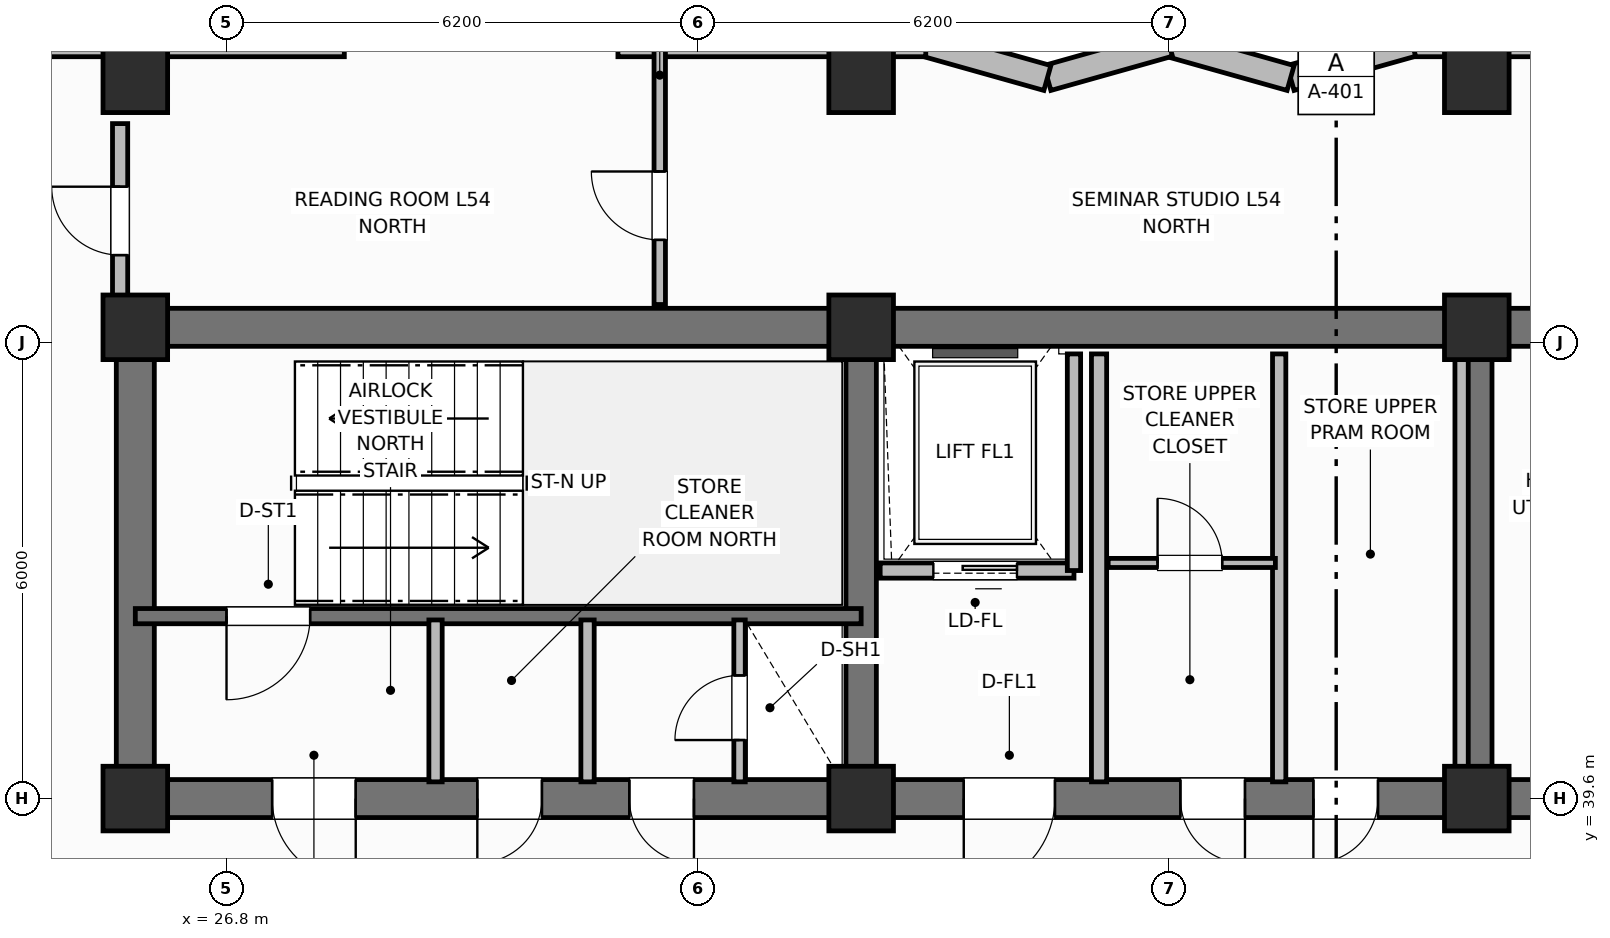
"""IFC4 building model, lengths in metres.
Left out: names, types, materials, properties, quantities, classifications, styles, units other than length and angle.
Written with IfcOpenShell. Run it as: python <this file> out.ifc"""

import sys

from ifc_helpers import new_model, si_unit, direction, frame, frame_2d, origin, origin_2d, place, context, subcontext, project, spatial, rectangle, extrude, element, fill, save


model = new_model("IFC4")
c1 = context("Model", 3, precision=1e-05, world=origin(), true_north=direction((0.0, 1.0)))
c2 = subcontext(c1, "Body", "Model", "MODEL_VIEW")
j1 = project(units=[si_unit("LENGTHUNIT", "METRE"), si_unit("PLANEANGLEUNIT", "RADIAN")], contexts=[c1])
p1 = place(None, origin())
s1 = spatial("IfcSite", under=j1, at=p1, CompositionType="ELEMENT")
p2 = place(p1, origin())
s2 = spatial("IfcBuilding", under=s1, at=p2, CompositionType="ELEMENT")
p3 = place(p2, frame((0.0, 0.0, 218.4)))
s3 = spatial("IfcBuildingStorey", under=s2, at=p3, CompositionType="ELEMENT", Elevation=218.4)
p4 = place(p3, frame((25.6, 45.8, 0.0), z_axis=(0.0, 0.0, 1.0), x_axis=(1.0, 0.0, 0.0)))
e1 = element("IfcWall", 1, at=p4, inside=s3, PredefinedType="SHEAR", context=c2, shape_type="SweptSolid", body=[
    extrude(rectangle(XDim=27.2, YDim=0.5, at=frame_2d((13.6, 0.0))), origin(), (0.0, 0.0, 1.0), 3.7),
])
p5 = place(p3, frame((25.6, 39.85, 0.0), z_axis=(0.0, 0.0, 1.0), x_axis=(0.0, 1.0, 0.0)))
e2 = element("IfcWall", 2, at=p5, inside=s3, PredefinedType="SHEAR", context=c2, shape_type="SweptSolid", body=[
    extrude(rectangle(XDim=5.7, YDim=0.5, at=frame_2d((2.85, 0.0))), origin(), (0.0, 0.0, 1.0), 3.7),
])
p6 = place(p3, frame((52.8, 39.6, 0.0), z_axis=(0.0, 0.0, 1.0), x_axis=(-1.0, 0.0, 0.0)))
e3 = element("IfcWall", 3, at=p6, inside=s3, PredefinedType="SHEAR", context=c2, shape_type="SweptSolid", body=[
    extrude(rectangle(XDim=27.2, YDim=0.5, at=frame_2d((13.6, 0.0))), origin(), (0.0, 0.0, 1.0), 3.7),
])
p7 = place(p6, frame((24.3, 0.0, 0.0)))
e4 = element("IfcOpeningElement", 4, at=p7, cuts=e3, PredefinedType="OPENING", context=c2, shape_type="SweptSolid", body=[
    extrude(rectangle(XDim=1.1, YDim=2.15, at=frame_2d((0.55, 1.075))), frame((0.0, 0.26, 0.0), z_axis=(0.0, -1.0, 0.0), x_axis=(1.0, 0.0, 0.0)), (0.0, 0.0, 1.0), 0.52),
])
p8 = place(p6, frame((21.85, 0.0, 0.0)))
e5 = element("IfcOpeningElement", 5, at=p8, cuts=e3, PredefinedType="OPENING", context=c2, shape_type="SweptSolid", body=[
    extrude(rectangle(XDim=0.85, YDim=2.1, at=frame_2d((0.425, 1.05))), frame((0.0, 0.26, 0.0), z_axis=(0.0, -1.0, 0.0), x_axis=(1.0, 0.0, 0.0)), (0.0, 0.0, 1.0), 0.52),
])
p9 = place(p6, frame((19.85, 0.0, 0.0)))
e6 = element("IfcOpeningElement", 6, at=p9, cuts=e3, PredefinedType="OPENING", context=c2, shape_type="SweptSolid", body=[
    extrude(rectangle(XDim=0.85, YDim=2.1, at=frame_2d((0.425, 1.05))), frame((0.0, 0.26, 0.0), z_axis=(0.0, -1.0, 0.0), x_axis=(1.0, 0.0, 0.0)), (0.0, 0.0, 1.0), 0.52),
])
p10 = place(p6, frame((15.1, 0.0, 0.0)))
e7 = element("IfcOpeningElement", 7, at=p10, cuts=e3, PredefinedType="OPENING", context=c2, shape_type="SweptSolid", body=[
    extrude(rectangle(XDim=1.2, YDim=2.15, at=frame_2d((0.6, 1.075))), frame((0.0, 0.26, 0.0), z_axis=(0.0, -1.0, 0.0), x_axis=(1.0, 0.0, 0.0)), (0.0, 0.0, 1.0), 0.52),
])
p11 = place(p6, frame((12.6, 0.0, 0.0)))
e8 = element("IfcOpeningElement", 8, at=p11, cuts=e3, PredefinedType="OPENING", context=c2, shape_type="SweptSolid", body=[
    extrude(rectangle(XDim=0.85, YDim=2.1, at=frame_2d((0.425, 1.05))), frame((0.0, 0.26, 0.0), z_axis=(0.0, -1.0, 0.0), x_axis=(1.0, 0.0, 0.0)), (0.0, 0.0, 1.0), 0.52),
])
p12 = place(p6, frame((10.85, 0.0, 0.0)))
e9 = element("IfcOpeningElement", 9, at=p12, cuts=e3, PredefinedType="OPENING", context=c2, shape_type="SweptSolid", body=[
    extrude(rectangle(XDim=0.85, YDim=2.1, at=frame_2d((0.425, 1.05))), frame((0.0, 0.26, 0.0), z_axis=(0.0, -1.0, 0.0), x_axis=(1.0, 0.0, 0.0)), (0.0, 0.0, 1.0), 0.52),
])
p13 = place(p6, frame((7.35, 0.0, 0.0)))
e10 = element("IfcOpeningElement", 10, at=p13, cuts=e3, PredefinedType="OPENING", context=c2, shape_type="SweptSolid", body=[
    extrude(rectangle(XDim=0.85, YDim=2.1, at=frame_2d((0.425, 1.05))), frame((0.0, 0.26, 0.0), z_axis=(0.0, -1.0, 0.0), x_axis=(1.0, 0.0, 0.0)), (0.0, 0.0, 1.0), 0.52),
])
p14 = place(p6, frame((4.2, 0.0, 0.0)))
e11 = element("IfcOpeningElement", 11, at=p14, cuts=e3, PredefinedType="OPENING", context=c2, shape_type="SweptSolid", body=[
    extrude(rectangle(XDim=1.3, YDim=2.2, at=frame_2d((0.65, 1.1))), frame((0.0, 0.26, 0.0), z_axis=(0.0, -1.0, 0.0), x_axis=(1.0, 0.0, 0.0)), (0.0, 0.0, 1.0), 0.52),
])
for number, where, z_axis, x_axis in (
    (12, (35.15, 39.85, 0.0), (0.0, 0.0, 1.0), (0.0, 1.0, 0.0)),
    (13, (43.25, 39.85, 0.0), (0.0, 0.0, 1.0), (0.0, 1.0, 0.0)),
):
    element("IfcWall", number, at=place(p3, frame(where, z_axis=z_axis, x_axis=x_axis)), inside=s3, PredefinedType="SHEAR", context=c2, shape_type="SweptSolid", body=[
        extrude(rectangle(XDim=5.7, YDim=0.4, at=frame_2d((2.85, 0.0))), origin(), (0.0, 0.0, 1.0), 3.7),
    ])
for number, where, z_axis, x_axis in (
    (14, (25.6, 39.6, 0.0), (0.0, 0.0, 1.0), (1.0, 0.0, 0.0)),
    (15, (25.6, 45.8, 0.0), (0.0, 0.0, 1.0), (1.0, 0.0, 0.0)),
    (16, (35.15, 39.6, 0.0), (0.0, 0.0, 1.0), (1.0, 0.0, 0.0)),
    (17, (35.15, 45.8, 0.0), (0.0, 0.0, 1.0), (1.0, 0.0, 0.0)),
    (18, (43.25, 39.6, 0.0), (0.0, 0.0, 1.0), (1.0, 0.0, 0.0)),
    (19, (43.25, 45.8, 0.0), (0.0, 0.0, 1.0), (1.0, 0.0, 0.0)),
    (20, (25.6, 49.05, 0.0), (0.0, 0.0, 1.0), (1.0, 0.0, 0.0)),
    (21, (35.15, 49.05, 0.0), (0.0, 0.0, 1.0), (1.0, 0.0, 0.0)),
    (22, (43.25, 49.05, 0.0), (0.0, 0.0, 1.0), (1.0, 0.0, 0.0)),
):
    element("IfcColumn", number, at=place(p3, frame(where, z_axis=z_axis, x_axis=x_axis)), inside=s3, PredefinedType="COLUMN", context=c2, shape_type="SweptSolid", body=[
        extrude(rectangle(XDim=0.85, YDim=0.85, at=origin_2d()), origin(), (0.0, 0.0, 1.0), 3.7),
    ])
p15 = place(p3, frame((47.75, 49.53, 0.0), z_axis=(0.0, 0.0, 1.0), x_axis=(-1.0, 0.0, 0.0)))
e23 = element("IfcWall", 23, at=p15, inside=s3, PredefinedType="SOLIDWALL", context=c2, shape_type="SweptSolid", body=[
    extrude(rectangle(XDim=5.35, YDim=0.34, at=frame_2d((2.675, 0.0))), origin(), (0.0, 0.0, 1.0), 2.72),
])
p16 = place(p3, frame((42.4, 49.53, 0.0), z_axis=(0.0, 0.0, 1.0), x_axis=(-0.962652136636, -0.270741322725, 0.0)))
e24 = element("IfcWall", 24, at=p16, inside=s3, PredefinedType="SOLIDWALL", context=c2, shape_type="SweptSolid", body=[
    extrude(rectangle(XDim=1.662, YDim=0.34, at=frame_2d((0.831, 0.0))), origin(), (0.0, 0.0, 1.0), 2.72),
])
p17 = place(p3, frame((40.8, 49.08, 0.0), z_axis=(0.0, 0.0, 1.0), x_axis=(-0.962662902433, 0.270703040766, 0.0)))
e25 = element("IfcWall", 25, at=p17, inside=s3, PredefinedType="SOLIDWALL", context=c2, shape_type="SweptSolid", body=[
    extrude(rectangle(XDim=1.662, YDim=0.34, at=frame_2d((0.831, 0.0))), origin(), (0.0, 0.0, 1.0), 2.72),
])
p18 = place(p3, frame((39.2, 49.53, 0.0), z_axis=(0.0, 0.0, 1.0), x_axis=(-0.962652136636, -0.270741322725, 0.0)))
e26 = element("IfcWall", 26, at=p18, inside=s3, PredefinedType="SOLIDWALL", context=c2, shape_type="SweptSolid", body=[
    extrude(rectangle(XDim=1.662, YDim=0.34, at=frame_2d((0.831, 0.0))), origin(), (0.0, 0.0, 1.0), 2.72),
])
p19 = place(p3, frame((37.6, 49.08, 0.0), z_axis=(0.0, 0.0, 1.0), x_axis=(-0.962662902433, 0.270703040766, 0.0)))
e27 = element("IfcWall", 27, at=p19, inside=s3, PredefinedType="SOLIDWALL", context=c2, shape_type="SweptSolid", body=[
    extrude(rectangle(XDim=1.662, YDim=0.34, at=frame_2d((0.831, 0.0))), origin(), (0.0, 0.0, 1.0), 2.72),
])
p20 = place(p3, frame((36.0, 49.53, 0.0), z_axis=(0.0, 0.0, 1.0), x_axis=(-1.0, 0.0, 0.0)))
e28 = element("IfcWall", 28, at=p20, inside=s3, PredefinedType="SOLIDWALL", context=c2, shape_type="SweptSolid", body=[
    extrude(rectangle(XDim=4.05, YDim=0.34, at=frame_2d((2.025, 0.0))), origin(), (0.0, 0.0, 1.0), 2.72),
])
p21 = place(p3, frame((28.35, 49.53, 0.0), z_axis=(0.0, 0.0, 1.0), x_axis=(-1.0, 0.0, 0.0)))
e29 = element("IfcWall", 29, at=p21, inside=s3, PredefinedType="SOLIDWALL", context=c2, shape_type="SweptSolid", body=[
    extrude(rectangle(XDim=8.15, YDim=0.34, at=frame_2d((4.075, 0.0))), origin(), (0.0, 0.0, 1.0), 2.72),
])
p22 = place(p3, frame((35.15, 42.0, 0.0), z_axis=(0.0, 0.0, 1.0), x_axis=(-1.0, 0.0, 0.0)))
e30 = element("IfcWall", 30, at=p22, inside=s3, PredefinedType="SHEAR", context=c2, shape_type="SweptSolid", body=[
    extrude(rectangle(XDim=9.55, YDim=0.2, at=frame_2d((4.775, 0.0))), origin(), (0.0, 0.0, 1.0), 3.7),
])
p23 = place(p22, frame((7.25, 0.0, 0.0)))
e31 = element("IfcOpeningElement", 31, at=p23, cuts=e30, PredefinedType="OPENING", context=c2, shape_type="SweptSolid", body=[
    extrude(rectangle(XDim=1.1, YDim=2.15, at=frame_2d((0.55, 1.075))), frame((0.0, 0.11, 0.0), z_axis=(0.0, -1.0, 0.0), x_axis=(1.0, 0.0, 0.0)), (0.0, 0.0, 1.0), 0.22),
])
p24 = place(p3, frame((33.55, 39.82, 0.0), z_axis=(0.0, 0.0, 1.0), x_axis=(0.0, 1.0, 0.0)))
e32 = element("IfcWall", 32, at=p24, inside=s3, PredefinedType="PARTITIONING", context=c2, shape_type="SweptSolid", body=[
    extrude(rectangle(XDim=2.13, YDim=0.15, at=frame_2d((1.065, 0.0))), origin(), (0.0, 0.0, 1.0), 2.55),
])
p25 = place(p24, frame((0.55, 0.0, 0.0)))
e33 = element("IfcOpeningElement", 33, at=p25, cuts=e32, PredefinedType="OPENING", context=c2, shape_type="SweptSolid", body=[
    extrude(rectangle(XDim=0.85, YDim=2.05, at=frame_2d((0.425, 1.025))), frame((0.0, 0.085, 0.0), z_axis=(0.0, -1.0, 0.0), x_axis=(1.0, 0.0, 0.0)), (0.0, 0.0, 1.0), 0.17),
])
for number, where, z_axis, x_axis in (
    (34, (29.55, 39.82, 0.0), (0.0, 0.0, 1.0), (0.0, 1.0, 0.0)),
    (35, (31.55, 39.82, 0.0), (0.0, 0.0, 1.0), (0.0, 1.0, 0.0)),
):
    element("IfcWall", number, at=place(p3, frame(where, z_axis=z_axis, x_axis=x_axis)), inside=s3, PredefinedType="PARTITIONING", context=c2, shape_type="SweptSolid", body=[
        extrude(rectangle(XDim=2.13, YDim=0.175, at=frame_2d((1.065, 0.0))), origin(), (0.0, 0.0, 1.0), 2.55),
    ])
p26 = place(p3, frame((37.95, 42.6, 0.0), z_axis=(0.0, 0.0, 1.0), x_axis=(-1.0, 0.0, 0.0)))
e36 = element("IfcWall", 36, at=p26, inside=s3, PredefinedType="PARTITIONING", context=c2, shape_type="SweptSolid", body=[
    extrude(rectangle(XDim=2.55, YDim=0.2, at=frame_2d((1.275, 0.0))), origin(), (0.0, 0.0, 1.0), 2.32),
])
p27 = place(p26, frame((0.75, 0.0, 0.0)))
e37 = element("IfcOpeningElement", 37, at=p27, cuts=e36, PredefinedType="OPENING", context=c2, shape_type="SweptSolid", body=[
    extrude(rectangle(XDim=1.1, YDim=2.15, at=frame_2d((0.55, 1.075))), frame((0.0, 0.11, 0.0), z_axis=(0.0, -1.0, 0.0), x_axis=(1.0, 0.0, 0.0)), (0.0, 0.0, 1.0), 0.22),
])
p28 = place(p3, frame((37.95, 42.6, 0.0), z_axis=(0.0, 0.0, 1.0), x_axis=(0.0, 1.0, 0.0)))
e38 = element("IfcWall", 38, at=p28, inside=s3, PredefinedType="PARTITIONING", context=c2, shape_type="SweptSolid", body=[
    extrude(rectangle(XDim=2.85, YDim=0.175, at=frame_2d((1.425, 0.0))), origin(), (0.0, 0.0, 1.0), 2.55),
])
p29 = place(p3, frame((38.28, 39.82, 0.0), z_axis=(0.0, 0.0, 1.0), x_axis=(0.0, 1.0, 0.0)))
e39 = element("IfcWall", 39, at=p29, inside=s3, PredefinedType="PARTITIONING", context=c2, shape_type="SweptSolid", body=[
    extrude(rectangle(XDim=5.63, YDim=0.2, at=frame_2d((2.815, 0.0))), origin(), (0.0, 0.0, 1.0), 2.55),
])
for number, where, z_axis, x_axis in (
    (40, (43.05, 39.82, 0.0), (0.0, 0.0, 1.0), (0.0, 1.0, 0.0)),
    (41, (40.65, 39.82, 0.0), (0.0, 0.0, 1.0), (0.0, 1.0, 0.0)),
):
    element("IfcWall", number, at=place(p3, frame(where, z_axis=z_axis, x_axis=x_axis)), inside=s3, PredefinedType="PARTITIONING", context=c2, shape_type="SweptSolid", body=[
        extrude(rectangle(XDim=5.63, YDim=0.175, at=frame_2d((2.815, 0.0))), origin(), (0.0, 0.0, 1.0), 2.55),
    ])
p30 = place(p3, frame((38.4, 42.7, 0.0), z_axis=(0.0, 0.0, 1.0), x_axis=(1.0, 0.0, 0.0)))
e42 = element("IfcWall", 42, at=p30, inside=s3, PredefinedType="PARTITIONING", context=c2, shape_type="SweptSolid", body=[
    extrude(rectangle(XDim=2.2, YDim=0.12, at=frame_2d((1.1, 0.0))), origin(), (0.0, 0.0, 1.0), 2.32),
])
p31 = place(p30, frame((0.65, 0.0, 0.0)))
e43 = element("IfcOpeningElement", 43, at=p31, cuts=e42, PredefinedType="OPENING", context=c2, shape_type="SweptSolid", body=[
    extrude(rectangle(XDim=0.85, YDim=2.1, at=frame_2d((0.425, 1.05))), frame((0.0, 0.07, 0.0), z_axis=(0.0, -1.0, 0.0), x_axis=(1.0, 0.0, 0.0)), (0.0, 0.0, 1.0), 0.14),
])
p32 = place(p3, frame((32.5, 46.1, 0.0), z_axis=(0.0, 0.0, 1.0), x_axis=(0.0, 1.0, 0.0)))
e44 = element("IfcWall", 44, at=p32, inside=s3, PredefinedType="PARTITIONING", context=c2, shape_type="SweptSolid", body=[
    extrude(rectangle(XDim=3.43, YDim=0.15, at=frame_2d((1.715, 0.0))), origin(), (0.0, 0.0, 1.0), 2.55),
])
p33 = place(p32, frame((0.85, 0.0, 0.0)))
e45 = element("IfcOpeningElement", 45, at=p33, cuts=e44, PredefinedType="OPENING", context=c2, shape_type="SweptSolid", body=[
    extrude(rectangle(XDim=0.9, YDim=2.1, at=frame_2d((0.45, 1.05))), frame((0.0, 0.085, 0.0), z_axis=(0.0, -1.0, 0.0), x_axis=(1.0, 0.0, 0.0)), (0.0, 0.0, 1.0), 0.17),
])
p34 = place(p3, frame((25.4, 46.1, 0.0), z_axis=(0.0, 0.0, 1.0), x_axis=(0.0, 1.0, 0.0)))
e46 = element("IfcWall", 46, at=p34, inside=s3, PredefinedType="PARTITIONING", context=c2, shape_type="SweptSolid", body=[
    extrude(rectangle(XDim=2.38, YDim=0.2, at=frame_2d((1.19, 0.0))), origin(), (0.0, 0.0, 1.0), 2.55),
])
p35 = place(p34, frame((0.65, 0.0, 0.0)))
e47 = element("IfcOpeningElement", 47, at=p35, cuts=e46, PredefinedType="OPENING", context=c2, shape_type="SweptSolid", body=[
    extrude(rectangle(XDim=0.9, YDim=2.1, at=frame_2d((0.45, 1.05))), frame((0.0, 0.11, 0.0), z_axis=(0.0, -1.0, 0.0), x_axis=(1.0, 0.0, 0.0)), (0.0, 0.0, 1.0), 0.22),
])
p36 = place(p23, origin())
e48 = element("IfcDoor", 48, at=p36, inside=s3, OperationType="SINGLE_SWING_RIGHT", PredefinedType="DOOR", context=c2, shape_type="SweptSolid", body=[
    extrude(rectangle(XDim=1.1, YDim=2.15, at=frame_2d((0.55, 1.075))), frame((0.0, 0.025, 0.0), z_axis=(0.0, -1.0, 0.0), x_axis=(1.0, 0.0, 0.0)), (0.0, 0.0, 1.0), 0.05),
])
fill(e31, e48)
p37 = place(p25, origin())
e49 = element("IfcDoor", 49, at=p37, inside=s3, OperationType="SINGLE_SWING_LEFT", PredefinedType="TRAPDOOR", context=c2, shape_type="SweptSolid", body=[
    extrude(rectangle(XDim=0.85, YDim=2.05, at=frame_2d((0.425, 1.025))), frame((0.0, 0.025, 0.0), z_axis=(0.0, -1.0, 0.0), x_axis=(1.0, 0.0, 0.0)), (0.0, 0.0, 1.0), 0.05),
])
fill(e33, e49)
p38 = place(p27, origin())
e50 = element("IfcDoor", 50, at=p38, inside=s3, OperationType="SLIDING_TO_LEFT", PredefinedType="DOOR", context=c2, shape_type="SweptSolid", body=[
    extrude(rectangle(XDim=1.1, YDim=2.15, at=frame_2d((0.55, 1.075))), frame((0.0, 0.025, 0.0), z_axis=(0.0, -1.0, 0.0), x_axis=(1.0, 0.0, 0.0)), (0.0, 0.0, 1.0), 0.05),
])
fill(e37, e50)
p39 = place(p31, origin())
e51 = element("IfcDoor", 51, at=p39, inside=s3, OperationType="SINGLE_SWING_LEFT", PredefinedType="DOOR", context=c2, shape_type="SweptSolid", body=[
    extrude(rectangle(XDim=0.85, YDim=2.1, at=frame_2d((0.425, 1.05))), frame((0.0, 0.025, 0.0), z_axis=(0.0, -1.0, 0.0), x_axis=(1.0, 0.0, 0.0)), (0.0, 0.0, 1.0), 0.05),
])
fill(e43, e51)
p40 = place(p33, origin())
e52 = element("IfcDoor", 52, at=p40, inside=s3, OperationType="SINGLE_SWING_RIGHT", PredefinedType="DOOR", context=c2, shape_type="SweptSolid", body=[
    extrude(rectangle(XDim=0.9, YDim=2.1, at=frame_2d((0.45, 1.05))), frame((0.0, 0.025, 0.0), z_axis=(0.0, -1.0, 0.0), x_axis=(1.0, 0.0, 0.0)), (0.0, 0.0, 1.0), 0.05),
])
fill(e45, e52)
p41 = place(p35, origin())
e53 = element("IfcDoor", 53, at=p41, inside=s3, OperationType="SINGLE_SWING_RIGHT", PredefinedType="DOOR", context=c2, shape_type="SweptSolid", body=[
    extrude(rectangle(XDim=0.9, YDim=2.1, at=frame_2d((0.45, 1.05))), frame((0.0, 0.025, 0.0), z_axis=(0.0, -1.0, 0.0), x_axis=(1.0, 0.0, 0.0)), (0.0, 0.0, 1.0), 0.05),
])
fill(e47, e53)
p42 = place(p7, origin())
e54 = element("IfcDoor", 54, at=p42, inside=s3, OperationType="SINGLE_SWING_LEFT", PredefinedType="DOOR", context=c2, shape_type="SweptSolid", body=[
    extrude(rectangle(XDim=1.1, YDim=2.15, at=frame_2d((0.55, 1.075))), frame((0.0, 0.025, 0.0), z_axis=(0.0, -1.0, 0.0), x_axis=(1.0, 0.0, 0.0)), (0.0, 0.0, 1.0), 0.05),
])
fill(e4, e54)
p43 = place(p8, origin())
e55 = element("IfcDoor", 55, at=p43, inside=s3, OperationType="SINGLE_SWING_RIGHT", PredefinedType="DOOR", context=c2, shape_type="SweptSolid", body=[
    extrude(rectangle(XDim=0.85, YDim=2.1, at=frame_2d((0.425, 1.05))), frame((0.0, 0.025, 0.0), z_axis=(0.0, -1.0, 0.0), x_axis=(1.0, 0.0, 0.0)), (0.0, 0.0, 1.0), 0.05),
])
fill(e5, e55)
p44 = place(p9, origin())
e56 = element("IfcDoor", 56, at=p44, inside=s3, OperationType="SINGLE_SWING_LEFT", PredefinedType="DOOR", context=c2, shape_type="SweptSolid", body=[
    extrude(rectangle(XDim=0.85, YDim=2.1, at=frame_2d((0.425, 1.05))), frame((0.0, 0.025, 0.0), z_axis=(0.0, -1.0, 0.0), x_axis=(1.0, 0.0, 0.0)), (0.0, 0.0, 1.0), 0.05),
])
fill(e6, e56)
p45 = place(p10, origin())
e57 = element("IfcDoor", 57, at=p45, inside=s3, OperationType="SINGLE_SWING_RIGHT", PredefinedType="DOOR", context=c2, shape_type="SweptSolid", body=[
    extrude(rectangle(XDim=1.2, YDim=2.15, at=frame_2d((0.6, 1.075))), frame((0.0, 0.025, 0.0), z_axis=(0.0, -1.0, 0.0), x_axis=(1.0, 0.0, 0.0)), (0.0, 0.0, 1.0), 0.05),
])
fill(e7, e57)
p46 = place(p11, origin())
e58 = element("IfcDoor", 58, at=p46, inside=s3, OperationType="SINGLE_SWING_LEFT", PredefinedType="DOOR", context=c2, shape_type="SweptSolid", body=[
    extrude(rectangle(XDim=0.85, YDim=2.1, at=frame_2d((0.425, 1.05))), frame((0.0, 0.025, 0.0), z_axis=(0.0, -1.0, 0.0), x_axis=(1.0, 0.0, 0.0)), (0.0, 0.0, 1.0), 0.05),
])
fill(e8, e58)
p47 = place(p12, origin())
e59 = element("IfcDoor", 59, at=p47, inside=s3, OperationType="SINGLE_SWING_RIGHT", PredefinedType="DOOR", context=c2, shape_type="SweptSolid", body=[
    extrude(rectangle(XDim=0.85, YDim=2.1, at=frame_2d((0.425, 1.05))), frame((0.0, 0.025, 0.0), z_axis=(0.0, -1.0, 0.0), x_axis=(1.0, 0.0, 0.0)), (0.0, 0.0, 1.0), 0.05),
])
fill(e9, e59)
save(model, sys.argv[1])
